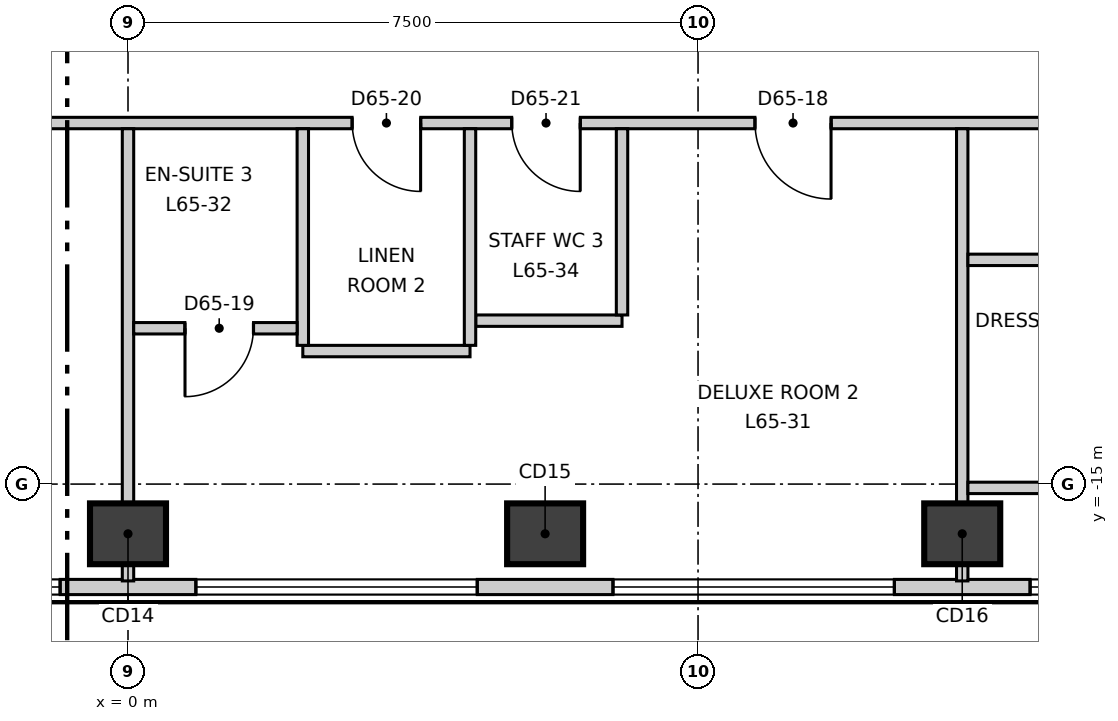
"""IFC4 building model, lengths in metres.
Left out: names, types, materials, properties, quantities, classifications, styles, units other than length and angle.
Written with IfcOpenShell. Run it as: python <this file> out.ifc"""

import sys

from ifc_helpers import new_model, si_unit, direction, frame, frame_2d, origin, origin_2d, place, context, subcontext, project, spatial, rectangle, extrude, element, fill, save


model = new_model("IFC4")
c1 = context("Model", 3, precision=1e-05, world=origin(), true_north=direction((0.0, 1.0)))
c2 = subcontext(c1, "Body", "Model", "MODEL_VIEW")
j1 = project(units=[si_unit("LENGTHUNIT", "METRE"), si_unit("PLANEANGLEUNIT", "RADIAN")], contexts=[c1])
p1 = place(None, origin())
s1 = spatial("IfcSite", under=j1, at=p1, CompositionType="ELEMENT")
p2 = place(p1, origin())
s2 = spatial("IfcBuilding", under=s1, at=p2, CompositionType="ELEMENT")
p3 = place(p2, frame((0.0, 0.0, 279.1)))
s3 = spatial("IfcBuildingStorey", under=s2, at=p3, CompositionType="ELEMENT", Elevation=279.1)
for number, where, z_axis, x_axis in (
    (1, (0.0, -15.654, -0.3), (0.0, 0.0, 1.0), (1.0, 0.0, 0.0)),
    (2, (5.488, -15.654, -0.3), (0.0, 0.0, 1.0), (1.0, 0.0, 0.0)),
    (3, (10.976, -15.654, -0.3), (0.0, 0.0, 1.0), (1.0, 0.0, 0.0)),
):
    element("IfcColumn", number, at=place(p3, frame(where, z_axis=z_axis, x_axis=x_axis)), inside=s3, PredefinedType="COLUMN", context=c2, shape_type="SweptSolid", body=[
        extrude(rectangle(XDim=1.0, YDim=0.8, at=origin_2d()), origin(), (0.0, 0.0, 1.0), 3.6),
    ])
p4 = place(p3, frame((-23.255, -16.354, 0.0), z_axis=(0.0, 0.0, 1.0), x_axis=(1.0, 0.0, 0.0)))
e4 = element("IfcWall", 4, at=p4, inside=s3, PredefinedType="ELEMENTEDWALL", context=c2, shape_type="SweptSolid", body=[
    extrude(rectangle(XDim=46.49, YDim=0.2, at=frame_2d((23.245, 0.0))), origin(), (0.0, 0.0, 1.0), 3.3),
])
p5 = place(p4, frame((2.197, 0.0, 0.9)))
e5 = element("IfcOpeningElement", 5, at=p5, cuts=e4, PredefinedType="OPENING", context=c2, shape_type="SweptSolid", body=[
    extrude(rectangle(XDim=3.7, YDim=2.2, at=frame_2d((1.85, 1.1))), frame((0.0, 0.11, 0.0), z_axis=(0.0, -1.0, 0.0), x_axis=(1.0, 0.0, 0.0)), (0.0, 0.0, 1.0), 0.22),
])
p6 = place(p4, frame((7.685, 0.0, 0.9)))
e6 = element("IfcOpeningElement", 6, at=p6, cuts=e4, PredefinedType="OPENING", context=c2, shape_type="SweptSolid", body=[
    extrude(rectangle(XDim=3.7, YDim=2.2, at=frame_2d((1.85, 1.1))), frame((0.0, 0.11, 0.0), z_axis=(0.0, -1.0, 0.0), x_axis=(1.0, 0.0, 0.0)), (0.0, 0.0, 1.0), 0.22),
])
p7 = place(p4, frame((13.173, 0.0, 0.9)))
e7 = element("IfcOpeningElement", 7, at=p7, cuts=e4, PredefinedType="OPENING", context=c2, shape_type="SweptSolid", body=[
    extrude(rectangle(XDim=3.7, YDim=2.2, at=frame_2d((1.85, 1.1))), frame((0.0, 0.11, 0.0), z_axis=(0.0, -1.0, 0.0), x_axis=(1.0, 0.0, 0.0)), (0.0, 0.0, 1.0), 0.22),
])
p8 = place(p4, frame((18.661, 0.0, 0.9)))
e8 = element("IfcOpeningElement", 8, at=p8, cuts=e4, PredefinedType="OPENING", context=c2, shape_type="SweptSolid", body=[
    extrude(rectangle(XDim=3.7, YDim=2.2, at=frame_2d((1.85, 1.1))), frame((0.0, 0.11, 0.0), z_axis=(0.0, -1.0, 0.0), x_axis=(1.0, 0.0, 0.0)), (0.0, 0.0, 1.0), 0.22),
])
p9 = place(p4, frame((24.149, 0.0, 0.9)))
e9 = element("IfcOpeningElement", 9, at=p9, cuts=e4, PredefinedType="OPENING", context=c2, shape_type="SweptSolid", body=[
    extrude(rectangle(XDim=3.7, YDim=2.2, at=frame_2d((1.85, 1.1))), frame((0.0, 0.11, 0.0), z_axis=(0.0, -1.0, 0.0), x_axis=(1.0, 0.0, 0.0)), (0.0, 0.0, 1.0), 0.22),
])
p10 = place(p4, frame((29.637, 0.0, 0.9)))
e10 = element("IfcOpeningElement", 10, at=p10, cuts=e4, PredefinedType="OPENING", context=c2, shape_type="SweptSolid", body=[
    extrude(rectangle(XDim=3.7, YDim=2.2, at=frame_2d((1.85, 1.1))), frame((0.0, 0.11, 0.0), z_axis=(0.0, -1.0, 0.0), x_axis=(1.0, 0.0, 0.0)), (0.0, 0.0, 1.0), 0.22),
])
p11 = place(p4, frame((35.125, 0.0, 0.9)))
e11 = element("IfcOpeningElement", 11, at=p11, cuts=e4, PredefinedType="OPENING", context=c2, shape_type="SweptSolid", body=[
    extrude(rectangle(XDim=3.7, YDim=2.2, at=frame_2d((1.85, 1.1))), frame((0.0, 0.11, 0.0), z_axis=(0.0, -1.0, 0.0), x_axis=(1.0, 0.0, 0.0)), (0.0, 0.0, 1.0), 0.22),
])
p12 = place(p4, frame((40.613, 0.0, 0.9)))
e12 = element("IfcOpeningElement", 12, at=p12, cuts=e4, PredefinedType="OPENING", context=c2, shape_type="SweptSolid", body=[
    extrude(rectangle(XDim=3.7, YDim=2.2, at=frame_2d((1.85, 1.1))), frame((0.0, 0.11, 0.0), z_axis=(0.0, -1.0, 0.0), x_axis=(1.0, 0.0, 0.0)), (0.0, 0.0, 1.0), 0.22),
])
p13 = place(p3, frame((25.791, -11.962, 0.0), z_axis=(0.0, 0.0, 1.0), x_axis=(-0.500006870765, 0.86602143691, 0.0)))
e13 = element("IfcWall", 13, at=p13, inside=s3, PredefinedType="ELEMENTEDWALL", context=c2, shape_type="SweptSolid", body=[
    extrude(rectangle(XDim=46.49, YDim=0.2, at=frame_2d((23.245, 0.0))), origin(), (0.0, 0.0, 1.0), 3.3),
])
p14 = place(p13, frame((2.197, 0.0, 0.9)))
e14 = element("IfcOpeningElement", 14, at=p14, cuts=e13, PredefinedType="OPENING", context=c2, shape_type="SweptSolid", body=[
    extrude(rectangle(XDim=3.7, YDim=2.2, at=frame_2d((1.85, 1.1))), frame((0.0, 0.11, 0.0), z_axis=(0.0, -1.0, 0.0), x_axis=(1.0, 0.0, 0.0)), (0.0, 0.0, 1.0), 0.22),
])
p15 = place(p13, frame((7.685, 0.0, 0.9)))
e15 = element("IfcOpeningElement", 15, at=p15, cuts=e13, PredefinedType="OPENING", context=c2, shape_type="SweptSolid", body=[
    extrude(rectangle(XDim=3.7, YDim=2.2, at=frame_2d((1.85, 1.1))), frame((0.0, 0.11, 0.0), z_axis=(0.0, -1.0, 0.0), x_axis=(1.0, 0.0, 0.0)), (0.0, 0.0, 1.0), 0.22),
])
p16 = place(p13, frame((13.173, 0.0, 0.9)))
e16 = element("IfcOpeningElement", 16, at=p16, cuts=e13, PredefinedType="OPENING", context=c2, shape_type="SweptSolid", body=[
    extrude(rectangle(XDim=3.7, YDim=2.2, at=frame_2d((1.85, 1.1))), frame((0.0, 0.11, 0.0), z_axis=(0.0, -1.0, 0.0), x_axis=(1.0, 0.0, 0.0)), (0.0, 0.0, 1.0), 0.22),
])
p17 = place(p13, frame((18.661, 0.0, 0.9)))
e17 = element("IfcOpeningElement", 17, at=p17, cuts=e13, PredefinedType="OPENING", context=c2, shape_type="SweptSolid", body=[
    extrude(rectangle(XDim=3.7, YDim=2.2, at=frame_2d((1.85, 1.1))), frame((0.0, 0.11, 0.0), z_axis=(0.0, -1.0, 0.0), x_axis=(1.0, 0.0, 0.0)), (0.0, 0.0, 1.0), 0.22),
])
p18 = place(p13, frame((24.149, 0.0, 0.9)))
e18 = element("IfcOpeningElement", 18, at=p18, cuts=e13, PredefinedType="OPENING", context=c2, shape_type="SweptSolid", body=[
    extrude(rectangle(XDim=3.7, YDim=2.2, at=frame_2d((1.85, 1.1))), frame((0.0, 0.11, 0.0), z_axis=(0.0, -1.0, 0.0), x_axis=(1.0, 0.0, 0.0)), (0.0, 0.0, 1.0), 0.22),
])
p19 = place(p13, frame((29.637, 0.0, 0.9)))
e19 = element("IfcOpeningElement", 19, at=p19, cuts=e13, PredefinedType="OPENING", context=c2, shape_type="SweptSolid", body=[
    extrude(rectangle(XDim=3.7, YDim=2.2, at=frame_2d((1.85, 1.1))), frame((0.0, 0.11, 0.0), z_axis=(0.0, -1.0, 0.0), x_axis=(1.0, 0.0, 0.0)), (0.0, 0.0, 1.0), 0.22),
])
p20 = place(p13, frame((35.125, 0.0, 0.9)))
e20 = element("IfcOpeningElement", 20, at=p20, cuts=e13, PredefinedType="OPENING", context=c2, shape_type="SweptSolid", body=[
    extrude(rectangle(XDim=3.7, YDim=2.2, at=frame_2d((1.85, 1.1))), frame((0.0, 0.11, 0.0), z_axis=(0.0, -1.0, 0.0), x_axis=(1.0, 0.0, 0.0)), (0.0, 0.0, 1.0), 0.22),
])
p21 = place(p13, frame((40.613, 0.0, 0.9)))
e21 = element("IfcOpeningElement", 21, at=p21, cuts=e13, PredefinedType="OPENING", context=c2, shape_type="SweptSolid", body=[
    extrude(rectangle(XDim=3.7, YDim=2.2, at=frame_2d((1.85, 1.1))), frame((0.0, 0.11, 0.0), z_axis=(0.0, -1.0, 0.0), x_axis=(1.0, 0.0, 0.0)), (0.0, 0.0, 1.0), 0.22),
])
p22 = place(p3, frame((-17.678, -10.119, 0.0), z_axis=(0.0, 0.0, 1.0), x_axis=(0.500003190174, 0.866023561929, 0.0)))
e22 = element("IfcWall", 22, at=p22, inside=s3, PredefinedType="PARTITIONING", context=c2, shape_type="SweptSolid", body=[
    extrude(rectangle(XDim=35.356, YDim=0.15, at=frame_2d((17.678, 0.0))), origin(), (0.0, 0.0, 1.0), 3.3),
])
p23 = place(p22, frame((28.706, 0.0, 0.0)))
e23 = element("IfcOpeningElement", 23, at=p23, cuts=e22, PredefinedType="OPENING", context=c2, shape_type="SweptSolid", body=[
    extrude(rectangle(XDim=1.0, YDim=2.1, at=frame_2d((0.5, 1.05))), frame((0.0, 0.085, 0.0), z_axis=(0.0, -1.0, 0.0), x_axis=(1.0, 0.0, 0.0)), (0.0, 0.0, 1.0), 0.17),
])
p24 = place(p22, frame((18.74, 0.0, 0.0)))
e24 = element("IfcOpeningElement", 24, at=p24, cuts=e22, PredefinedType="OPENING", context=c2, shape_type="SweptSolid", body=[
    extrude(rectangle(XDim=1.0, YDim=2.1, at=frame_2d((0.5, 1.05))), frame((0.0, 0.085, 0.0), z_axis=(0.0, -1.0, 0.0), x_axis=(1.0, 0.0, 0.0)), (0.0, 0.0, 1.0), 0.17),
])
p25 = place(p22, frame((9.352, 0.0, 0.0)))
e25 = element("IfcOpeningElement", 25, at=p25, cuts=e22, PredefinedType="OPENING", context=c2, shape_type="SweptSolid", body=[
    extrude(rectangle(XDim=1.0, YDim=2.1, at=frame_2d((0.5, 1.05))), frame((0.0, 0.085, 0.0), z_axis=(0.0, -1.0, 0.0), x_axis=(1.0, 0.0, 0.0)), (0.0, 0.0, 1.0), 0.17),
])
p26 = place(p22, frame((2.777, 0.0, 0.0)))
e26 = element("IfcOpeningElement", 26, at=p26, cuts=e22, PredefinedType="OPENING", context=c2, shape_type="SweptSolid", body=[
    extrude(rectangle(XDim=1.0, YDim=2.1, at=frame_2d((0.5, 1.05))), frame((0.0, 0.085, 0.0), z_axis=(0.0, -1.0, 0.0), x_axis=(1.0, 0.0, 0.0)), (0.0, 0.0, 1.0), 0.17),
])
p27 = place(p3, frame((-17.604, -10.25, 0.0), z_axis=(0.0, 0.0, 1.0), x_axis=(1.0, 0.0, 0.0)))
e27 = element("IfcWall", 27, at=p27, inside=s3, PredefinedType="PARTITIONING", context=c2, shape_type="SweptSolid", body=[
    extrude(rectangle(XDim=35.358, YDim=0.15, at=frame_2d((17.679, 0.0))), origin(), (0.0, 0.0, 1.0), 3.3),
])
p28 = place(p27, frame((2.7, 0.0, 0.0)))
e28 = element("IfcOpeningElement", 28, at=p28, cuts=e27, PredefinedType="OPENING", context=c2, shape_type="SweptSolid", body=[
    extrude(rectangle(XDim=1.0, YDim=2.1, at=frame_2d((0.5, 1.05))), frame((0.0, 0.085, 0.0), z_axis=(0.0, -1.0, 0.0), x_axis=(1.0, 0.0, 0.0)), (0.0, 0.0, 1.0), 0.17),
])
p29 = place(p27, frame((14.878, 0.0, 0.0)))
e29 = element("IfcOpeningElement", 29, at=p29, cuts=e27, PredefinedType="OPENING", context=c2, shape_type="SweptSolid", body=[
    extrude(rectangle(XDim=1.0, YDim=2.1, at=frame_2d((0.5, 1.05))), frame((0.0, 0.085, 0.0), z_axis=(0.0, -1.0, 0.0), x_axis=(1.0, 0.0, 0.0)), (0.0, 0.0, 1.0), 0.17),
])
p30 = place(p27, frame((9.578, 0.0, 0.0)))
e30 = element("IfcOpeningElement", 30, at=p30, cuts=e27, PredefinedType="OPENING", context=c2, shape_type="SweptSolid", body=[
    extrude(rectangle(XDim=0.9, YDim=2.1, at=frame_2d((0.45, 1.05))), frame((0.0, 0.085, 0.0), z_axis=(0.0, -1.0, 0.0), x_axis=(1.0, 0.0, 0.0)), (0.0, 0.0, 1.0), 0.17),
])
p31 = place(p27, frame((11.678, 0.0, 0.0)))
e31 = element("IfcOpeningElement", 31, at=p31, cuts=e27, PredefinedType="OPENING", context=c2, shape_type="SweptSolid", body=[
    extrude(rectangle(XDim=0.9, YDim=2.1, at=frame_2d((0.45, 1.05))), frame((0.0, 0.085, 0.0), z_axis=(0.0, -1.0, 0.0), x_axis=(1.0, 0.0, 0.0)), (0.0, 0.0, 1.0), 0.17),
])
p32 = place(p27, frame((25.854, 0.0, 0.0)))
e32 = element("IfcOpeningElement", 32, at=p32, cuts=e27, PredefinedType="OPENING", context=c2, shape_type="SweptSolid", body=[
    extrude(rectangle(XDim=1.0, YDim=2.1, at=frame_2d((0.5, 1.05))), frame((0.0, 0.085, 0.0), z_axis=(0.0, -1.0, 0.0), x_axis=(1.0, 0.0, 0.0)), (0.0, 0.0, 1.0), 0.17),
])
p33 = place(p27, frame((20.554, 0.0, 0.0)))
e33 = element("IfcOpeningElement", 33, at=p33, cuts=e27, PredefinedType="OPENING", context=c2, shape_type="SweptSolid", body=[
    extrude(rectangle(XDim=0.9, YDim=2.1, at=frame_2d((0.45, 1.05))), frame((0.0, 0.085, 0.0), z_axis=(0.0, -1.0, 0.0), x_axis=(1.0, 0.0, 0.0)), (0.0, 0.0, 1.0), 0.17),
])
p34 = place(p27, frame((22.654, 0.0, 0.0)))
e34 = element("IfcOpeningElement", 34, at=p34, cuts=e27, PredefinedType="OPENING", context=c2, shape_type="SweptSolid", body=[
    extrude(rectangle(XDim=0.9, YDim=2.1, at=frame_2d((0.45, 1.05))), frame((0.0, 0.085, 0.0), z_axis=(0.0, -1.0, 0.0), x_axis=(1.0, 0.0, 0.0)), (0.0, 0.0, 1.0), 0.17),
])
p35 = place(p27, frame((31.43, 0.0, 0.0)))
e35 = element("IfcOpeningElement", 35, at=p35, cuts=e27, PredefinedType="OPENING", context=c2, shape_type="SweptSolid", body=[
    extrude(rectangle(XDim=1.0, YDim=2.1, at=frame_2d((0.5, 1.05))), frame((0.0, 0.085, 0.0), z_axis=(0.0, -1.0, 0.0), x_axis=(1.0, 0.0, 0.0)), (0.0, 0.0, 1.0), 0.17),
])
p36 = place(p3, frame((2.3, -13.25, 0.0), z_axis=(0.0, 0.0, 1.0), x_axis=(1.0, 0.0, 0.0)))
e36 = element("IfcWall", 36, at=p36, inside=s3, PredefinedType="PARTITIONING", context=c2, shape_type="SweptSolid", body=[
    extrude(rectangle(XDim=2.2, YDim=0.15, at=frame_2d((1.1, 0.0))), origin(), (0.0, 0.0, 1.0), 3.3),
])
p37 = place(p3, frame((4.575, -12.85, 0.0), z_axis=(0.0, 0.0, 1.0), x_axis=(1.0, 0.0, 0.0)))
e37 = element("IfcWall", 37, at=p37, inside=s3, PredefinedType="PARTITIONING", context=c2, shape_type="SweptSolid", body=[
    extrude(rectangle(XDim=1.925, YDim=0.15, at=frame_2d((0.962, 0.0))), origin(), (0.0, 0.0, 1.0), 3.3),
])
p38 = place(p3, frame((0.0, -16.274, 0.0), z_axis=(0.0, 0.0, 1.0), x_axis=(0.0, 1.0, 0.0)))
e38 = element("IfcWall", 38, at=p38, inside=s3, PredefinedType="PARTITIONING", context=c2, shape_type="SweptSolid", body=[
    extrude(rectangle(XDim=5.949, YDim=0.15, at=frame_2d((2.975, 0.0))), origin(), (0.0, 0.0, 1.0), 2.8),
])
p39 = place(p3, frame((0.075, 20.37, 0.0), z_axis=(0.0, 0.0, 1.0), x_axis=(0.500003985697, -0.866023102629, 0.0)))
e39 = element("IfcWall", 39, at=p39, inside=s3, PredefinedType="PARTITIONING", context=c2, shape_type="SweptSolid", body=[
    extrude(rectangle(XDim=35.206, YDim=0.15, at=frame_2d((17.603, 0.0))), origin(), (0.0, 0.0, 1.0), 3.3),
])
p40 = place(p39, frame((31.506, 0.0, 0.0)))
e40 = element("IfcOpeningElement", 40, at=p40, cuts=e39, PredefinedType="OPENING", context=c2, shape_type="SweptSolid", body=[
    extrude(rectangle(XDim=1.0, YDim=2.1, at=frame_2d((0.5, 1.05))), frame((0.0, 0.085, 0.0), z_axis=(0.0, -1.0, 0.0), x_axis=(1.0, 0.0, 0.0)), (0.0, 0.0, 1.0), 0.17),
])
p41 = place(p39, frame((26.529, 0.0, 0.0)))
e41 = element("IfcOpeningElement", 41, at=p41, cuts=e39, PredefinedType="OPENING", context=c2, shape_type="SweptSolid", body=[
    extrude(rectangle(XDim=1.0, YDim=2.1, at=frame_2d((0.5, 1.05))), frame((0.0, 0.085, 0.0), z_axis=(0.0, -1.0, 0.0), x_axis=(1.0, 0.0, 0.0)), (0.0, 0.0, 1.0), 0.17),
])
p42 = place(p39, frame((19.442, 0.0, 0.0)))
e42 = element("IfcOpeningElement", 42, at=p42, cuts=e39, PredefinedType="OPENING", context=c2, shape_type="SweptSolid", body=[
    extrude(rectangle(XDim=1.0, YDim=2.1, at=frame_2d((0.5, 1.05))), frame((0.0, 0.085, 0.0), z_axis=(0.0, -1.0, 0.0), x_axis=(1.0, 0.0, 0.0)), (0.0, 0.0, 1.0), 0.17),
])
p43 = place(p39, frame((8.254, 0.0, 0.0)))
e43 = element("IfcOpeningElement", 43, at=p43, cuts=e39, PredefinedType="OPENING", context=c2, shape_type="SweptSolid", body=[
    extrude(rectangle(XDim=1.0, YDim=2.1, at=frame_2d((0.5, 1.05))), frame((0.0, 0.085, 0.0), z_axis=(0.0, -1.0, 0.0), x_axis=(1.0, 0.0, 0.0)), (0.0, 0.0, 1.0), 0.17),
])
p44 = place(p39, frame((13.754, 0.0, 0.0)))
e44 = element("IfcOpeningElement", 44, at=p44, cuts=e39, PredefinedType="OPENING", context=c2, shape_type="SweptSolid", body=[
    extrude(rectangle(XDim=0.9, YDim=2.1, at=frame_2d((0.45, 1.05))), frame((0.0, 0.085, 0.0), z_axis=(0.0, -1.0, 0.0), x_axis=(1.0, 0.0, 0.0)), (0.0, 0.0, 1.0), 0.17),
])
p45 = place(p39, frame((11.554, 0.0, 0.0)))
e45 = element("IfcOpeningElement", 45, at=p45, cuts=e39, PredefinedType="OPENING", context=c2, shape_type="SweptSolid", body=[
    extrude(rectangle(XDim=0.9, YDim=2.1, at=frame_2d((0.45, 1.05))), frame((0.0, 0.085, 0.0), z_axis=(0.0, -1.0, 0.0), x_axis=(1.0, 0.0, 0.0)), (0.0, 0.0, 1.0), 0.17),
])
p46 = place(p39, frame((2.777, 0.0, 0.0)))
e46 = element("IfcOpeningElement", 46, at=p46, cuts=e39, PredefinedType="OPENING", context=c2, shape_type="SweptSolid", body=[
    extrude(rectangle(XDim=1.0, YDim=2.1, at=frame_2d((0.5, 1.05))), frame((0.0, 0.085, 0.0), z_axis=(0.0, -1.0, 0.0), x_axis=(1.0, 0.0, 0.0)), (0.0, 0.0, 1.0), 0.17),
])
for number, where, z_axis, x_axis in (
    (47, (2.3, -13.175, 0.0), (0.0, 0.0, 1.0), (0.0, 1.0, 0.0)),
    (48, (4.5, -13.175, 0.0), (0.0, 0.0, 1.0), (0.0, 1.0, 0.0)),
):
    element("IfcWall", number, at=place(p3, frame(where, z_axis=z_axis, x_axis=x_axis)), inside=s3, PredefinedType="PARTITIONING", context=c2, shape_type="SweptSolid", body=[
        extrude(rectangle(XDim=2.85, YDim=0.15, at=frame_2d((1.425, 0.0))), origin(), (0.0, 0.0, 1.0), 3.3),
    ])
p47 = place(p3, frame((6.5, -12.775, 0.0), z_axis=(0.0, 0.0, 1.0), x_axis=(0.0, 1.0, 0.0)))
e49 = element("IfcWall", 49, at=p47, inside=s3, PredefinedType="PARTITIONING", context=c2, shape_type="SweptSolid", body=[
    extrude(rectangle(XDim=2.45, YDim=0.15, at=frame_2d((1.225, 0.0))), origin(), (0.0, 0.0, 1.0), 3.3),
])
p48 = place(p3, frame((10.976, -16.274, 0.0), z_axis=(0.0, 0.0, 1.0), x_axis=(0.0, 1.0, 0.0)))
e50 = element("IfcWall", 50, at=p48, inside=s3, PredefinedType="PARTITIONING", context=c2, shape_type="SweptSolid", body=[
    extrude(rectangle(XDim=5.949, YDim=0.15, at=frame_2d((2.975, 0.0))), origin(), (0.0, 0.0, 1.0), 3.3),
])
p49 = place(p3, frame((11.051, -12.05, 0.0), z_axis=(0.0, 0.0, 1.0), x_axis=(1.0, 0.0, 0.0)))
e51 = element("IfcWall", 51, at=p49, inside=s3, PredefinedType="PARTITIONING", context=c2, shape_type="SweptSolid", body=[
    extrude(rectangle(XDim=5.525, YDim=0.15, at=frame_2d((2.762, 0.0))), origin(), (0.0, 0.0, 1.0), 3.3),
])
p50 = place(p49, frame((1.075, 0.0, 0.0)))
e52 = element("IfcOpeningElement", 52, at=p50, cuts=e51, PredefinedType="OPENING", context=c2, shape_type="SweptSolid", body=[
    extrude(rectangle(XDim=0.9, YDim=2.1, at=frame_2d((0.45, 1.05))), frame((0.0, 0.085, 0.0), z_axis=(0.0, -1.0, 0.0), x_axis=(1.0, 0.0, 0.0)), (0.0, 0.0, 1.0), 0.17),
])
p51 = place(p3, frame((11.051, -15.05, 0.0), z_axis=(0.0, 0.0, 1.0), x_axis=(1.0, 0.0, 0.0)))
e53 = element("IfcWall", 53, at=p51, inside=s3, PredefinedType="PARTITIONING", context=c2, shape_type="SweptSolid", body=[
    extrude(rectangle(XDim=3.125, YDim=0.15, at=frame_2d((1.562, 0.0))), origin(), (0.0, 0.0, 1.0), 3.3),
])
p52 = place(p3, frame((0.075, -12.95, 0.0), z_axis=(0.0, 0.0, 1.0), x_axis=(1.0, 0.0, 0.0)))
e54 = element("IfcWall", 54, at=p52, inside=s3, PredefinedType="PARTITIONING", context=c2, shape_type="SweptSolid", body=[
    extrude(rectangle(XDim=2.15, YDim=0.15, at=frame_2d((1.075, 0.0))), origin(), (0.0, 0.0, 1.0), 3.3),
])
p53 = place(p52, frame((0.675, 0.0, 0.0)))
e55 = element("IfcOpeningElement", 55, at=p53, cuts=e54, PredefinedType="OPENING", context=c2, shape_type="SweptSolid", body=[
    extrude(rectangle(XDim=0.9, YDim=2.1, at=frame_2d((0.45, 1.05))), frame((0.0, 0.085, 0.0), z_axis=(0.0, -1.0, 0.0), x_axis=(1.0, 0.0, 0.0)), (0.0, 0.0, 1.0), 0.17),
])
p54 = place(p8, origin())
e56 = element("IfcWindow", 56, at=p54, inside=s3, PartitioningType="SINGLE_PANEL", PredefinedType="WINDOW", context=c2, shape_type="SweptSolid", body=[
    extrude(rectangle(XDim=3.7, YDim=2.2, at=frame_2d((1.85, 1.1))), frame((0.0, 0.03, 0.0), z_axis=(0.0, -1.0, 0.0), x_axis=(1.0, 0.0, 0.0)), (0.0, 0.0, 1.0), 0.06),
])
fill(e8, e56)
p55 = place(p9, origin())
e57 = element("IfcWindow", 57, at=p55, inside=s3, PartitioningType="SINGLE_PANEL", PredefinedType="WINDOW", context=c2, shape_type="SweptSolid", body=[
    extrude(rectangle(XDim=3.7, YDim=2.2, at=frame_2d((1.85, 1.1))), frame((0.0, 0.03, 0.0), z_axis=(0.0, -1.0, 0.0), x_axis=(1.0, 0.0, 0.0)), (0.0, 0.0, 1.0), 0.06),
])
fill(e9, e57)
p56 = place(p10, origin())
e58 = element("IfcWindow", 58, at=p56, inside=s3, PartitioningType="SINGLE_PANEL", PredefinedType="WINDOW", context=c2, shape_type="SweptSolid", body=[
    extrude(rectangle(XDim=3.7, YDim=2.2, at=frame_2d((1.85, 1.1))), frame((0.0, 0.03, 0.0), z_axis=(0.0, -1.0, 0.0), x_axis=(1.0, 0.0, 0.0)), (0.0, 0.0, 1.0), 0.06),
])
fill(e10, e58)
p57 = place(p11, origin())
e59 = element("IfcWindow", 59, at=p57, inside=s3, PartitioningType="SINGLE_PANEL", PredefinedType="WINDOW", context=c2, shape_type="SweptSolid", body=[
    extrude(rectangle(XDim=3.7, YDim=2.2, at=frame_2d((1.85, 1.1))), frame((0.0, 0.03, 0.0), z_axis=(0.0, -1.0, 0.0), x_axis=(1.0, 0.0, 0.0)), (0.0, 0.0, 1.0), 0.06),
])
fill(e11, e59)
p58 = place(p32, origin())
e60 = element("IfcDoor", 60, at=p58, inside=s3, OperationType="SINGLE_SWING_RIGHT", PredefinedType="DOOR", context=c2, shape_type="SweptSolid", body=[
    extrude(rectangle(XDim=1.0, YDim=2.1, at=frame_2d((0.5, 1.05))), frame((0.0, 0.025, 0.0), z_axis=(0.0, -1.0, 0.0), x_axis=(1.0, 0.0, 0.0)), (0.0, 0.0, 1.0), 0.05),
])
fill(e32, e60)
p59 = place(p53, origin())
e61 = element("IfcDoor", 61, at=p59, inside=s3, OperationType="SINGLE_SWING_LEFT", PredefinedType="DOOR", context=c2, shape_type="SweptSolid", body=[
    extrude(rectangle(XDim=0.9, YDim=2.1, at=frame_2d((0.45, 1.05))), frame((0.0, 0.025, 0.0), z_axis=(0.0, -1.0, 0.0), x_axis=(1.0, 0.0, 0.0)), (0.0, 0.0, 1.0), 0.05),
])
fill(e55, e61)
p60 = place(p33, origin())
e62 = element("IfcDoor", 62, at=p60, inside=s3, OperationType="SINGLE_SWING_RIGHT", PredefinedType="DOOR", context=c2, shape_type="SweptSolid", body=[
    extrude(rectangle(XDim=0.9, YDim=2.1, at=frame_2d((0.45, 1.05))), frame((0.0, 0.025, 0.0), z_axis=(0.0, -1.0, 0.0), x_axis=(1.0, 0.0, 0.0)), (0.0, 0.0, 1.0), 0.05),
])
fill(e33, e62)
p61 = place(p34, origin())
e63 = element("IfcDoor", 63, at=p61, inside=s3, OperationType="SINGLE_SWING_RIGHT", PredefinedType="DOOR", context=c2, shape_type="SweptSolid", body=[
    extrude(rectangle(XDim=0.9, YDim=2.1, at=frame_2d((0.45, 1.05))), frame((0.0, 0.025, 0.0), z_axis=(0.0, -1.0, 0.0), x_axis=(1.0, 0.0, 0.0)), (0.0, 0.0, 1.0), 0.05),
])
fill(e34, e63)
save(model, sys.argv[1])
